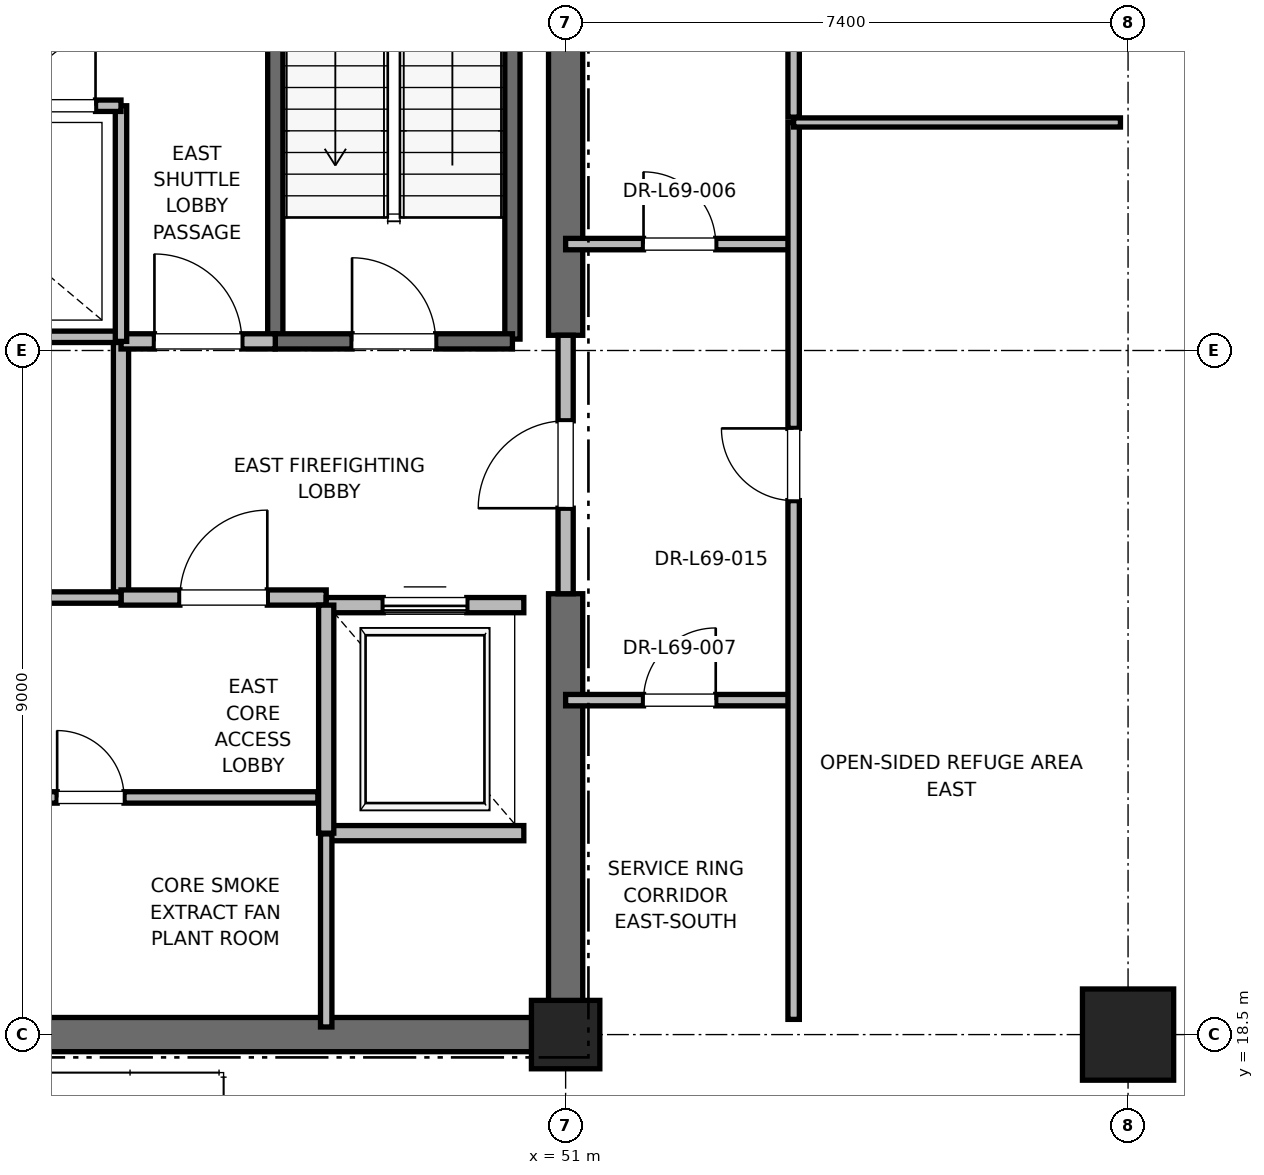
"""IFC4 building model, lengths in metres.
Left out: names, types, materials, properties, quantities, classifications, styles, units other than length and angle.
Written with IfcOpenShell. Run it as: python <this file> out.ifc"""

import sys

from ifc_helpers import new_model, si_unit, direction, frame, frame_2d, origin, origin_2d, place, context, subcontext, project, spatial, rectangle, extrude, element, fill, save


model = new_model("IFC4")
c1 = context("Model", 3, precision=1e-05, world=origin(), true_north=direction((0.0, 1.0)))
c2 = subcontext(c1, "Body", "Model", "MODEL_VIEW")
j1 = project(units=[si_unit("LENGTHUNIT", "METRE"), si_unit("PLANEANGLEUNIT", "RADIAN")], contexts=[c1])
p1 = place(None, origin())
s1 = spatial("IfcSite", under=j1, at=p1, CompositionType="ELEMENT")
p2 = place(p1, origin())
s2 = spatial("IfcBuilding", under=s1, at=p2, CompositionType="ELEMENT")
p3 = place(p2, frame((0.0, 0.0, 295.2)))
s3 = spatial("IfcBuildingStorey", under=s2, at=p3, CompositionType="ELEMENT", Elevation=295.2)
p4 = place(p3, frame((58.4, 18.5, 0.0), z_axis=(0.0, 0.0, 1.0), x_axis=(1.0, 0.0, 0.0)))
e1 = element("IfcColumn", 1, at=p4, inside=s3, PredefinedType="COLUMN", context=c2, shape_type="SweptSolid", body=[
    extrude(rectangle(XDim=1.2, YDim=1.2, at=origin_2d()), origin(), (0.0, 0.0, 1.0), 5.8),
])
p5 = place(p3, frame((51.0, 18.5, 0.0), z_axis=(0.0, 0.0, 1.0), x_axis=(1.0, 0.0, 0.0)))
e2 = element("IfcColumn", 2, at=p5, inside=s3, PredefinedType="PILASTER", context=c2, shape_type="SweptSolid", body=[
    extrude(rectangle(XDim=0.9, YDim=0.9, at=origin_2d()), origin(), (0.0, 0.0, 1.0), 5.8),
])
p6 = place(p3, frame((41.8, 18.5, 0.0), z_axis=(0.0, 0.0, 1.0), x_axis=(1.0, 0.0, 0.0)))
e3 = element("IfcWall", 3, at=p6, inside=s3, PredefinedType="SHEAR", context=c2, shape_type="SweptSolid", body=[
    extrude(rectangle(XDim=9.2, YDim=0.45, at=frame_2d((4.6, 0.0))), origin(), (0.0, 0.0, 1.0), 5.5),
])
p7 = place(p3, frame((51.0, 18.5, 0.0), z_axis=(0.0, 0.0, 1.0), x_axis=(0.0, 1.0, 0.0)))
e4 = element("IfcWall", 4, at=p7, inside=s3, PredefinedType="SHEAR", context=c2, shape_type="SweptSolid", body=[
    extrude(rectangle(XDim=5.8, YDim=0.45, at=frame_2d((2.9, 0.0))), origin(), (0.0, 0.0, 1.0), 5.5),
])
p8 = place(p3, frame((51.0, 27.7, 0.0), z_axis=(0.0, 0.0, 1.0), x_axis=(0.0, 1.0, 0.0)))
e5 = element("IfcWall", 5, at=p8, inside=s3, PredefinedType="SHEAR", context=c2, shape_type="SweptSolid", body=[
    extrude(rectangle(XDim=8.8, YDim=0.45, at=frame_2d((4.4, 0.0))), origin(), (0.0, 0.0, 1.0), 5.5),
])
p9 = place(p3, frame((50.3, 27.65, 0.0), z_axis=(0.0, 0.0, 1.0), x_axis=(0.0, 1.0, 0.0)))
e6 = element("IfcWall", 6, at=p9, inside=s3, PredefinedType="SOLIDWALL", context=c2, shape_type="SweptSolid", body=[
    extrude(rectangle(XDim=8.15, YDim=0.2, at=frame_2d((4.075, 0.0))), origin(), (0.0, 0.0, 1.0), 5.5),
])
p10 = place(p3, frame((47.18, 27.62, 0.0), z_axis=(0.0, 0.0, 1.0), x_axis=(0.0, 1.0, 0.0)))
e7 = element("IfcWall", 7, at=p10, inside=s3, PredefinedType="SOLIDWALL", context=c2, shape_type="SweptSolid", body=[
    extrude(rectangle(XDim=8.18, YDim=0.2, at=frame_2d((4.09, 0.0))), origin(), (0.0, 0.0, 1.0), 5.5),
])
p11 = place(p3, frame((47.18, 27.62, 0.0), z_axis=(0.0, 0.0, 1.0), x_axis=(1.0, 0.0, 0.0)))
e8 = element("IfcWall", 8, at=p11, inside=s3, PredefinedType="SOLIDWALL", context=c2, shape_type="SweptSolid", body=[
    extrude(rectangle(XDim=3.12, YDim=0.2, at=frame_2d((1.56, 0.0))), origin(), (0.0, 0.0, 1.0), 5.5),
])
p12 = place(p11, frame((1.01, 0.0, 0.0)))
e9 = element("IfcOpeningElement", 9, at=p12, cuts=e8, PredefinedType="OPENING", context=c2, shape_type="SweptSolid", body=[
    extrude(rectangle(XDim=1.1, YDim=2.15, at=frame_2d((0.55, 1.075))), frame((0.0, 0.1, 0.0), z_axis=(0.0, -1.0, 0.0), x_axis=(1.0, 0.0, 0.0)), (0.0, 0.0, 1.0), 0.2),
])
p13 = place(p3, frame((45.15, 24.25, 0.0), z_axis=(0.0, 0.0, 1.0), x_axis=(0.0, 1.0, 0.0)))
e10 = element("IfcWall", 10, at=p13, inside=s3, PredefinedType="PARTITIONING", context=c2, shape_type="SweptSolid", body=[
    extrude(rectangle(XDim=3.37, YDim=0.2, at=frame_2d((1.685, 0.0))), origin(), (0.0, 0.0, 1.0), 5.5),
])
p14 = place(p3, frame((45.15, 24.25, 0.0), z_axis=(0.0, 0.0, 1.0), x_axis=(1.0, 0.0, 0.0)))
e11 = element("IfcWall", 11, at=p14, inside=s3, PredefinedType="PARTITIONING", context=c2, shape_type="SweptSolid", body=[
    extrude(rectangle(XDim=2.7, YDim=0.2, at=frame_2d((1.35, 0.0))), origin(), (0.0, 0.0, 1.0), 5.5),
])
p15 = place(p14, frame((0.775, 0.0, 0.0)))
e12 = element("IfcOpeningElement", 12, at=p15, cuts=e11, PredefinedType="OPENING", context=c2, shape_type="SweptSolid", body=[
    extrude(rectangle(XDim=1.15, YDim=2.2, at=frame_2d((0.575, 1.1))), frame((0.0, 0.1, 0.0), z_axis=(0.0, -1.0, 0.0), x_axis=(1.0, 0.0, 0.0)), (0.0, 0.0, 1.0), 0.2),
])
p16 = place(p3, frame((45.15, 27.62, 0.0), z_axis=(0.0, 0.0, 1.0), x_axis=(1.0, 0.0, 0.0)))
e13 = element("IfcWall", 13, at=p16, inside=s3, PredefinedType="PARTITIONING", context=c2, shape_type="SweptSolid", body=[
    extrude(rectangle(XDim=2.03, YDim=0.2, at=frame_2d((1.015, 0.0))), origin(), (0.0, 0.0, 1.0), 5.5),
])
p17 = place(p16, frame((0.44, 0.0, 0.0)))
e14 = element("IfcOpeningElement", 14, at=p17, cuts=e13, PredefinedType="OPENING", context=c2, shape_type="SweptSolid", body=[
    extrude(rectangle(XDim=1.15, YDim=2.2, at=frame_2d((0.575, 1.1))), frame((0.0, 0.1, 0.0), z_axis=(0.0, -1.0, 0.0), x_axis=(1.0, 0.0, 0.0)), (0.0, 0.0, 1.0), 0.2),
])
p18 = place(p3, frame((51.0, 24.3, 0.0), z_axis=(0.0, 0.0, 1.0), x_axis=(0.0, 1.0, 0.0)))
e15 = element("IfcWall", 15, at=p18, inside=s3, PredefinedType="PARTITIONING", context=c2, shape_type="SweptSolid", body=[
    extrude(rectangle(XDim=3.4, YDim=0.2, at=frame_2d((1.7, 0.0))), origin(), (0.0, 0.0, 1.0), 4.58),
])
p19 = place(p18, frame((1.125, 0.0, 0.0)))
e16 = element("IfcOpeningElement", 16, at=p19, cuts=e15, PredefinedType="OPENING", context=c2, shape_type="SweptSolid", body=[
    extrude(rectangle(XDim=1.15, YDim=2.2, at=frame_2d((0.575, 1.1))), frame((0.0, 0.1, 0.0), z_axis=(0.0, -1.0, 0.0), x_axis=(1.0, 0.0, 0.0)), (0.0, 0.0, 1.0), 0.2),
])
p20 = place(p3, frame((47.85, 21.15, 0.0), z_axis=(0.0, 0.0, 1.0), x_axis=(1.0, 0.0, 0.0)))
e17 = element("IfcWall", 17, at=p20, inside=s3, PredefinedType="SOLIDWALL", context=c2, shape_type="SweptSolid", body=[
    extrude(rectangle(XDim=2.6, YDim=0.2, at=frame_2d((1.3, 0.0))), origin(), (0.0, 0.0, 1.0), 5.5),
])
p21 = place(p3, frame((50.45, 24.15, 0.0), z_axis=(0.0, 0.0, 1.0), x_axis=(-1.0, 0.0, 0.0)))
e18 = element("IfcWall", 18, at=p21, inside=s3, PredefinedType="SOLIDWALL", context=c2, shape_type="SweptSolid", body=[
    extrude(rectangle(XDim=2.6, YDim=0.2, at=frame_2d((1.3, 0.0))), origin(), (0.0, 0.0, 1.0), 4.58),
])
p22 = place(p21, frame((0.75, 0.0, 0.0)))
e19 = element("IfcOpeningElement", 19, at=p22, cuts=e18, PredefinedType="OPENING", context=c2, shape_type="SweptSolid", body=[
    extrude(rectangle(XDim=1.1, YDim=2.2, at=frame_2d((0.55, 1.1))), frame((0.0, 0.1, 0.0), z_axis=(0.0, -1.0, 0.0), x_axis=(1.0, 0.0, 0.0)), (0.0, 0.0, 1.0), 0.2),
])
p23 = place(p3, frame((47.85, 24.15, 0.0), z_axis=(0.0, 0.0, 1.0), x_axis=(0.0, -1.0, 0.0)))
e20 = element("IfcWall", 20, at=p23, inside=s3, PredefinedType="SOLIDWALL", context=c2, shape_type="SweptSolid", body=[
    extrude(rectangle(XDim=3.0, YDim=0.2, at=frame_2d((1.5, 0.0))), origin(), (0.0, 0.0, 1.0), 5.5),
])
p24 = place(p3, frame((41.56, 27.68, 0.0), z_axis=(0.0, 0.0, 1.0), x_axis=(1.0, 0.0, 0.0)))
e21 = element("IfcWall", 21, at=p24, inside=s3, PredefinedType="PARTITIONING", context=c2, shape_type="SweptSolid", body=[
    extrude(rectangle(XDim=3.59, YDim=0.15, at=frame_2d((1.795, 0.0))), origin(), (0.0, 0.0, 1.0), 2.85),
])
p25 = place(p3, frame((47.85, 18.6, 0.0), z_axis=(0.0, 0.0, 1.0), x_axis=(0.0, 1.0, 0.0)))
e22 = element("IfcWall", 22, at=p25, inside=s3, PredefinedType="PARTITIONING", context=c2, shape_type="SweptSolid", body=[
    extrude(rectangle(XDim=2.54, YDim=0.15, at=frame_2d((1.27, 0.0))), origin(), (0.0, 0.0, 1.0), 2.85),
])
p26 = place(p3, frame((41.76, 21.62, 0.0), z_axis=(0.0, 0.0, 1.0), x_axis=(1.0, 0.0, 0.0)))
e23 = element("IfcWall", 23, at=p26, inside=s3, PredefinedType="PARTITIONING", context=c2, shape_type="SweptSolid", body=[
    extrude(rectangle(XDim=5.98, YDim=0.15, at=frame_2d((2.99, 0.0))), origin(), (0.0, 0.0, 1.0), 2.85),
])
p27 = place(p26, frame((2.55, 0.0, 0.0)))
e24 = element("IfcOpeningElement", 24, at=p27, cuts=e23, PredefinedType="OPENING", context=c2, shape_type="SweptSolid", body=[
    extrude(rectangle(XDim=0.88, YDim=2.1, at=frame_2d((0.44, 1.05))), frame((0.0, 0.075, 0.0), z_axis=(0.0, -1.0, 0.0), x_axis=(1.0, 0.0, 0.0)), (0.0, 0.0, 1.0), 0.15),
])
p28 = place(p3, frame((41.76, 24.25, 0.0), z_axis=(0.0, 0.0, 1.0), x_axis=(1.0, 0.0, 0.0)))
e25 = element("IfcWall", 25, at=p28, inside=s3, PredefinedType="PARTITIONING", context=c2, shape_type="SweptSolid", body=[
    extrude(rectangle(XDim=3.39, YDim=0.15, at=frame_2d((1.695, 0.0))), origin(), (0.0, 0.0, 1.0), 2.85),
])
p29 = place(p28, frame((1.255, 0.0, 0.0)))
e26 = element("IfcOpeningElement", 26, at=p29, cuts=e25, PredefinedType="OPENING", context=c2, shape_type="SweptSolid", body=[
    extrude(rectangle(XDim=0.88, YDim=2.1, at=frame_2d((0.44, 1.05))), frame((0.0, 0.075, 0.0), z_axis=(0.0, -1.0, 0.0), x_axis=(1.0, 0.0, 0.0)), (0.0, 0.0, 1.0), 0.15),
])
p30 = place(p3, frame((45.15, 27.62, 0.0), z_axis=(0.0, 0.0, 1.0), x_axis=(0.0, 1.0, 0.0)))
e27 = element("IfcWall", 27, at=p30, inside=s3, PredefinedType="PARTITIONING", context=c2, shape_type="SweptSolid", body=[
    extrude(rectangle(XDim=3.1, YDim=0.15, at=frame_2d((1.55, 0.0))), origin(), (0.0, 0.0, 1.0), 2.85),
])
p31 = place(p3, frame((43.6, 30.72, 0.0), z_axis=(0.0, 0.0, 1.0), x_axis=(1.0, 0.0, 0.0)))
e28 = element("IfcWall", 28, at=p31, inside=s3, PredefinedType="PARTITIONING", context=c2, shape_type="SweptSolid", body=[
    extrude(rectangle(XDim=1.55, YDim=0.15, at=frame_2d((0.775, 0.0))), origin(), (0.0, 0.0, 1.0), 2.85),
])
p32 = place(p31, frame((0.335, 0.0, 0.0)))
e29 = element("IfcOpeningElement", 29, at=p32, cuts=e28, PredefinedType="OPENING", context=c2, shape_type="SweptSolid", body=[
    extrude(rectangle(XDim=0.88, YDim=2.1, at=frame_2d((0.44, 1.05))), frame((0.0, 0.075, 0.0), z_axis=(0.0, -1.0, 0.0), x_axis=(1.0, 0.0, 0.0)), (0.0, 0.0, 1.0), 0.15),
])
p33 = place(p3, frame((51.0, 22.9, 0.0), z_axis=(0.0, 0.0, 1.0), x_axis=(1.0, 0.0, 0.0)))
e30 = element("IfcWall", 30, at=p33, inside=s3, PredefinedType="PARTITIONING", context=c2, shape_type="SweptSolid", body=[
    extrude(rectangle(XDim=3.0, YDim=0.15, at=frame_2d((1.5, 0.0))), origin(), (0.0, 0.0, 1.0), 2.85),
])
p34 = place(p33, frame((1.025, 0.0, 0.0)))
e31 = element("IfcOpeningElement", 31, at=p34, cuts=e30, PredefinedType="OPENING", context=c2, shape_type="SweptSolid", body=[
    extrude(rectangle(XDim=0.95, YDim=2.15, at=frame_2d((0.475, 1.075))), frame((0.0, 0.075, 0.0), z_axis=(0.0, -1.0, 0.0), x_axis=(1.0, 0.0, 0.0)), (0.0, 0.0, 1.0), 0.15),
])
p35 = place(p3, frame((51.0, 28.9, 0.0), z_axis=(0.0, 0.0, 1.0), x_axis=(1.0, 0.0, 0.0)))
e32 = element("IfcWall", 32, at=p35, inside=s3, PredefinedType="PARTITIONING", context=c2, shape_type="SweptSolid", body=[
    extrude(rectangle(XDim=3.0, YDim=0.15, at=frame_2d((1.5, 0.0))), origin(), (0.0, 0.0, 1.0), 2.85),
])
p36 = place(p35, frame((1.025, 0.0, 0.0)))
e33 = element("IfcOpeningElement", 33, at=p36, cuts=e32, PredefinedType="OPENING", context=c2, shape_type="SweptSolid", body=[
    extrude(rectangle(XDim=0.95, YDim=2.15, at=frame_2d((0.475, 1.075))), frame((0.0, 0.075, 0.0), z_axis=(0.0, -1.0, 0.0), x_axis=(1.0, 0.0, 0.0)), (0.0, 0.0, 1.0), 0.15),
])
p37 = place(p3, frame((54.0, 18.7, 0.0), z_axis=(0.0, 0.0, 1.0), x_axis=(0.0, 1.0, 0.0)))
e34 = element("IfcWall", 34, at=p37, inside=s3, PredefinedType="PARTITIONING", context=c2, shape_type="SweptSolid", body=[
    extrude(rectangle(XDim=11.8, YDim=0.15, at=frame_2d((5.9, 0.0))), origin(), (0.0, 0.0, 1.0), 2.85),
])
p38 = place(p37, frame((6.825, 0.0, 0.0)))
e35 = element("IfcOpeningElement", 35, at=p38, cuts=e34, PredefinedType="OPENING", context=c2, shape_type="SweptSolid", body=[
    extrude(rectangle(XDim=0.95, YDim=2.15, at=frame_2d((0.475, 1.075))), frame((0.0, 0.075, 0.0), z_axis=(0.0, -1.0, 0.0), x_axis=(1.0, 0.0, 0.0)), (0.0, 0.0, 1.0), 0.15),
])
p39 = place(p3, frame((54.0, 30.5, 0.0), z_axis=(0.0, 0.0, 1.0), x_axis=(1.0, 0.0, 0.0)))
e36 = element("IfcWall", 36, at=p39, inside=s3, PredefinedType="PARTITIONING", context=c2, shape_type="SweptSolid", body=[
    extrude(rectangle(XDim=4.3, YDim=0.12, at=frame_2d((2.15, 0.0))), origin(), (0.0, 0.0, 1.0), 2.85),
])
p40 = place(p3, frame((54.0, 30.57, 0.0), z_axis=(0.0, 0.0, 1.0), x_axis=(0.0, 1.0, 0.0)))
e37 = element("IfcWall", 37, at=p40, inside=s3, PredefinedType="PARTITIONING", context=c2, shape_type="SweptSolid", body=[
    extrude(rectangle(XDim=5.73, YDim=0.15, at=frame_2d((2.865, 0.0))), origin(), (0.0, 0.0, 1.0), 2.85),
])
p41 = place(p40, frame((2.065, 0.0, 0.0)))
e38 = element("IfcOpeningElement", 38, at=p41, cuts=e37, PredefinedType="OPENING", context=c2, shape_type="SweptSolid", body=[
    extrude(rectangle(XDim=1.6, YDim=2.25, at=frame_2d((0.8, 1.125))), frame((0.0, 0.075, 0.0), z_axis=(0.0, -1.0, 0.0), x_axis=(1.0, 0.0, 0.0)), (0.0, 0.0, 1.0), 0.15),
])
p42 = place(p12, origin())
e39 = element("IfcDoor", 39, at=p42, inside=s3, OperationType="SINGLE_SWING_LEFT", PredefinedType="DOOR", context=c2, shape_type="SweptSolid", body=[
    extrude(rectangle(XDim=1.1, YDim=2.15, at=frame_2d((0.55, 1.075))), frame((0.0, 0.025, 0.0), z_axis=(0.0, -1.0, 0.0), x_axis=(1.0, 0.0, 0.0)), (0.0, 0.0, 1.0), 0.05),
])
fill(e9, e39)
p43 = place(p15, origin())
e40 = element("IfcDoor", 40, at=p43, inside=s3, OperationType="SINGLE_SWING_RIGHT", PredefinedType="DOOR", context=c2, shape_type="SweptSolid", body=[
    extrude(rectangle(XDim=1.15, YDim=2.2, at=frame_2d((0.575, 1.1))), frame((0.0, 0.025, 0.0), z_axis=(0.0, -1.0, 0.0), x_axis=(1.0, 0.0, 0.0)), (0.0, 0.0, 1.0), 0.05),
])
fill(e12, e40)
p44 = place(p17, origin())
e41 = element("IfcDoor", 41, at=p44, inside=s3, OperationType="SINGLE_SWING_LEFT", PredefinedType="DOOR", context=c2, shape_type="SweptSolid", body=[
    extrude(rectangle(XDim=1.15, YDim=2.2, at=frame_2d((0.575, 1.1))), frame((0.0, 0.025, 0.0), z_axis=(0.0, -1.0, 0.0), x_axis=(1.0, 0.0, 0.0)), (0.0, 0.0, 1.0), 0.05),
])
fill(e14, e41)
p45 = place(p19, origin())
e42 = element("IfcDoor", 42, at=p45, inside=s3, OperationType="SINGLE_SWING_LEFT", PredefinedType="DOOR", context=c2, shape_type="SweptSolid", body=[
    extrude(rectangle(XDim=1.15, YDim=2.2, at=frame_2d((0.575, 1.1))), frame((0.0, 0.025, 0.0), z_axis=(0.0, -1.0, 0.0), x_axis=(1.0, 0.0, 0.0)), (0.0, 0.0, 1.0), 0.05),
])
fill(e16, e42)
p46 = place(p22, origin())
e43 = element("IfcDoor", 43, at=p46, inside=s3, OperationType="SLIDING_TO_RIGHT", PredefinedType="DOOR", context=c2, shape_type="SweptSolid", body=[
    extrude(rectangle(XDim=1.1, YDim=2.2, at=frame_2d((0.55, 1.1))), frame((0.0, 0.025, 0.0), z_axis=(0.0, -1.0, 0.0), x_axis=(1.0, 0.0, 0.0)), (0.0, 0.0, 1.0), 0.05),
])
fill(e19, e43)
p47 = place(p27, origin())
e44 = element("IfcDoor", 44, at=p47, inside=s3, OperationType="SINGLE_SWING_LEFT", PredefinedType="DOOR", context=c2, shape_type="SweptSolid", body=[
    extrude(rectangle(XDim=0.88, YDim=2.1, at=frame_2d((0.44, 1.05))), frame((0.0, 0.025, 0.0), z_axis=(0.0, -1.0, 0.0), x_axis=(1.0, 0.0, 0.0)), (0.0, 0.0, 1.0), 0.05),
])
fill(e24, e44)
p48 = place(p32, origin())
e45 = element("IfcDoor", 45, at=p48, inside=s3, OperationType="SINGLE_SWING_RIGHT", PredefinedType="DOOR", context=c2, shape_type="SweptSolid", body=[
    extrude(rectangle(XDim=0.88, YDim=2.1, at=frame_2d((0.44, 1.05))), frame((0.0, 0.025, 0.0), z_axis=(0.0, -1.0, 0.0), x_axis=(1.0, 0.0, 0.0)), (0.0, 0.0, 1.0), 0.05),
])
fill(e29, e45)
p49 = place(p34, origin())
e46 = element("IfcDoor", 46, at=p49, inside=s3, OperationType="SINGLE_SWING_RIGHT", PredefinedType="DOOR", context=c2, shape_type="SweptSolid", body=[
    extrude(rectangle(XDim=0.95, YDim=2.15, at=frame_2d((0.475, 1.075))), frame((0.0, 0.025, 0.0), z_axis=(0.0, -1.0, 0.0), x_axis=(1.0, 0.0, 0.0)), (0.0, 0.0, 1.0), 0.05),
])
fill(e31, e46)
p50 = place(p36, origin())
e47 = element("IfcDoor", 47, at=p50, inside=s3, OperationType="SINGLE_SWING_LEFT", PredefinedType="DOOR", context=c2, shape_type="SweptSolid", body=[
    extrude(rectangle(XDim=0.95, YDim=2.15, at=frame_2d((0.475, 1.075))), frame((0.0, 0.025, 0.0), z_axis=(0.0, -1.0, 0.0), x_axis=(1.0, 0.0, 0.0)), (0.0, 0.0, 1.0), 0.05),
])
fill(e33, e47)
p51 = place(p38, origin())
e48 = element("IfcDoor", 48, at=p51, inside=s3, OperationType="SINGLE_SWING_RIGHT", PredefinedType="DOOR", context=c2, shape_type="SweptSolid", body=[
    extrude(rectangle(XDim=0.95, YDim=2.15, at=frame_2d((0.475, 1.075))), frame((0.0, 0.025, 0.0), z_axis=(0.0, -1.0, 0.0), x_axis=(1.0, 0.0, 0.0)), (0.0, 0.0, 1.0), 0.05),
])
fill(e35, e48)
save(model, sys.argv[1])
